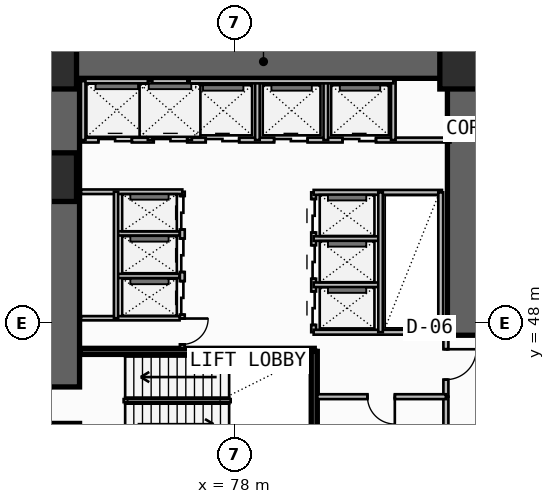
"""IFC4 building model, lengths in metres.
Left out: names, types, materials, properties, quantities, classifications, styles, units other than length and angle.
Written with IfcOpenShell. Run it as: python <this file> out.ifc"""

import sys

from ifc_helpers import new_model, si_unit, direction, frame, frame_2d, origin, origin_2d, place, context, subcontext, project, spatial, rectangle, extrude, element, fill, save


model = new_model("IFC4")
c1 = context("Model", 3, precision=1e-05, world=origin(), true_north=direction((0.0, 1.0)))
c2 = subcontext(c1, "Body", "Model", "MODEL_VIEW")
j1 = project(units=[si_unit("LENGTHUNIT", "METRE"), si_unit("PLANEANGLEUNIT", "RADIAN")], contexts=[c1])
p1 = place(None, origin())
s1 = spatial("IfcSite", under=j1, at=p1, CompositionType="ELEMENT")
p2 = place(p1, origin())
s2 = spatial("IfcBuilding", under=s1, at=p2, CompositionType="ELEMENT")
p3 = place(p2, origin())
s3 = spatial("IfcBuildingStorey", under=s2, at=p3, CompositionType="ELEMENT", Elevation=0.0)
p4 = place(p3, frame((72.35, 43.35, -0.4), z_axis=(0.0, 0.0, 1.0), x_axis=(0.0, 1.0, 0.0)))
e1 = element("IfcWall", 1, at=p4, inside=s3, PredefinedType="SHEAR", context=c2, shape_type="SweptSolid", body=[
    extrude(rectangle(XDim=12.7, YDim=1.1, at=frame_2d((6.35, 0.0))), origin(), (0.0, 0.0, 1.0), 4.58),
])
p5 = place(p4, frame((1.35, 0.0, 0.4)))
e2 = element("IfcOpeningElement", 2, at=p5, cuts=e1, PredefinedType="OPENING", context=c2, shape_type="SweptSolid", body=[
    extrude(rectangle(XDim=1.2, YDim=2.2, at=frame_2d((0.6, 1.1))), frame((0.0, 0.56, 0.0), z_axis=(0.0, -1.0, 0.0), x_axis=(1.0, 0.0, 0.0)), (0.0, 0.0, 1.0), 1.12),
])
p6 = place(p3, frame((71.8, 56.6, -0.4), z_axis=(0.0, 0.0, 1.0), x_axis=(1.0, 0.0, 0.0)))
e3 = element("IfcWall", 3, at=p6, inside=s3, PredefinedType="SHEAR", context=c2, shape_type="SweptSolid", body=[
    extrude(rectangle(XDim=14.3, YDim=1.1, at=frame_2d((7.15, 0.0))), origin(), (0.0, 0.0, 1.0), 4.58),
])
p7 = place(p3, frame((85.55, 47.6, -0.4), z_axis=(0.0, 0.0, 1.0), x_axis=(0.0, 1.0, 0.0)))
e4 = element("IfcWall", 4, at=p7, inside=s3, PredefinedType="SHEAR", context=c2, shape_type="SweptSolid", body=[
    extrude(rectangle(XDim=8.45, YDim=1.1, at=frame_2d((4.225, 0.0))), origin(), (0.0, 0.0, 1.0), 4.58),
])
for number, where, z_axis, x_axis in (
    (5, (72.0, 52.8, 0.0), (0.0, 0.0, 1.0), (1.0, 0.0, 0.0)),
    (6, (72.0, 56.5, 0.0), (0.0, 0.0, 1.0), (1.0, 0.0, 0.0)),
    (7, (85.55, 56.5, 0.0), (0.0, 0.0, 1.0), (1.0, 0.0, 0.0)),
):
    element("IfcColumn", number, at=place(p3, frame(where, z_axis=z_axis, x_axis=x_axis)), inside=s3, PredefinedType="COLUMN", context=c2, shape_type="SweptSolid", body=[
        extrude(rectangle(XDim=1.6, YDim=1.6, at=origin_2d()), origin(), (0.0, 0.0, 1.0), 4.5),
    ])
p8 = place(p3, frame((72.92, 47.07, -0.4), z_axis=(0.0, 0.0, 1.0), x_axis=(1.0, 0.0, 0.0)))
e8 = element("IfcWall", 8, at=p8, inside=s3, PredefinedType="SOLIDWALL", context=c2, shape_type="SweptSolid", body=[
    extrude(rectangle(XDim=7.7, YDim=0.2, at=frame_2d((3.85, 0.0))), origin(), (0.0, 0.0, 1.0), 4.58),
])
p9 = place(p3, frame((80.62, 43.83, -0.4), z_axis=(0.0, 0.0, 1.0), x_axis=(0.0, 1.0, 0.0)))
e9 = element("IfcWall", 9, at=p9, inside=s3, PredefinedType="SOLIDWALL", context=c2, shape_type="SweptSolid", body=[
    extrude(rectangle(XDim=3.24, YDim=0.2, at=frame_2d((1.62, 0.0))), origin(), (0.0, 0.0, 1.0), 4.58),
])
p10 = place(p3, frame((84.95, 43.68, 0.0), z_axis=(0.0, 0.0, 1.0), x_axis=(0.0, 1.0, 0.0)))
e10 = element("IfcWall", 10, at=p10, inside=s3, PredefinedType="PLUMBINGWALL", context=c2, shape_type="SweptSolid", body=[
    extrude(rectangle(XDim=1.9, YDim=0.165, at=frame_2d((0.95, 0.0))), origin(), (0.0, 0.0, 1.0), 4.18),
])
p11 = place(p3, frame((84.95, 45.58, 0.0), z_axis=(0.0, 0.0, 1.0), x_axis=(0.0, 1.0, 0.0)))
e11 = element("IfcWall", 11, at=p11, inside=s3, PredefinedType="PARTITIONING", context=c2, shape_type="SweptSolid", body=[
    extrude(rectangle(XDim=2.12, YDim=0.165, at=frame_2d((1.06, 0.0))), origin(), (0.0, 0.0, 1.0), 4.18),
])
p12 = place(p11, frame((0.56, 0.0, 0.0)))
e12 = element("IfcOpeningElement", 12, at=p12, cuts=e11, PredefinedType="OPENING", context=c2, shape_type="SweptSolid", body=[
    extrude(rectangle(XDim=1.0, YDim=2.2, at=frame_2d((0.5, 1.1))), frame((0.0, 0.093, 0.0), z_axis=(0.0, -1.0, 0.0), x_axis=(1.0, 0.0, 0.0)), (0.0, 0.0, 1.0), 0.185),
])
p13 = place(p3, frame((80.72, 45.58, 0.0), z_axis=(0.0, 0.0, 1.0), x_axis=(1.0, 0.0, 0.0)))
e13 = element("IfcWall", 13, at=p13, inside=s3, PredefinedType="PLUMBINGWALL", context=c2, shape_type="SweptSolid", body=[
    extrude(rectangle(XDim=4.23, YDim=0.16, at=frame_2d((2.115, 0.0))), origin(), (0.0, 0.0, 1.0), 4.18),
])
p14 = place(p13, frame((1.65, 0.0, 0.0)))
e14 = element("IfcOpeningElement", 14, at=p14, cuts=e13, PredefinedType="OPENING", context=c2, shape_type="SweptSolid", body=[
    extrude(rectangle(XDim=0.9, YDim=2.1, at=frame_2d((0.45, 1.05))), frame((0.0, 0.09, 0.0), z_axis=(0.0, -1.0, 0.0), x_axis=(1.0, 0.0, 0.0)), (0.0, 0.0, 1.0), 0.18),
])
p15 = place(p3, frame((76.28, 47.18, 0.0), z_axis=(0.0, 0.0, 1.0), x_axis=(0.0, 1.0, 0.0)))
e15 = element("IfcWall", 15, at=p15, inside=s3, PredefinedType="SOLIDWALL", context=c2, shape_type="SweptSolid", body=[
    extrude(rectangle(XDim=5.14, YDim=0.16, at=frame_2d((2.57, 0.0))), origin(), (0.0, 0.0, 1.0), 4.18),
])
p16 = place(p15, frame((1.1, 0.0, 0.0)))
e16 = element("IfcOpeningElement", 16, at=p16, cuts=e15, PredefinedType="OPENING", context=c2, shape_type="SweptSolid", body=[
    extrude(rectangle(XDim=1.1, YDim=2.25, at=frame_2d((0.55, 1.125))), frame((0.0, 0.09, 0.0), z_axis=(0.0, -1.0, 0.0), x_axis=(1.0, 0.0, 0.0)), (0.0, 0.0, 1.0), 0.18),
])
p17 = place(p15, frame((2.5, 0.0, 0.0)))
e17 = element("IfcOpeningElement", 17, at=p17, cuts=e15, PredefinedType="OPENING", context=c2, shape_type="SweptSolid", body=[
    extrude(rectangle(XDim=1.1, YDim=2.25, at=frame_2d((0.55, 1.125))), frame((0.0, 0.09, 0.0), z_axis=(0.0, -1.0, 0.0), x_axis=(1.0, 0.0, 0.0)), (0.0, 0.0, 1.0), 0.18),
])
p18 = place(p15, frame((3.9, 0.0, 0.0)))
e18 = element("IfcOpeningElement", 18, at=p18, cuts=e15, PredefinedType="OPENING", context=c2, shape_type="SweptSolid", body=[
    extrude(rectangle(XDim=1.1, YDim=2.25, at=frame_2d((0.55, 1.125))), frame((0.0, 0.09, 0.0), z_axis=(0.0, -1.0, 0.0), x_axis=(1.0, 0.0, 0.0)), (0.0, 0.0, 1.0), 0.18),
])
p19 = place(p15, frame((0.12, 0.0, 0.0)))
e19 = element("IfcOpeningElement", 19, at=p19, cuts=e15, PredefinedType="OPENING", context=c2, shape_type="SweptSolid", body=[
    extrude(rectangle(XDim=0.85, YDim=2.05, at=frame_2d((0.425, 1.025))), frame((0.0, 0.09, 0.0), z_axis=(0.0, -1.0, 0.0), x_axis=(1.0, 0.0, 0.0)), (0.0, 0.0, 1.0), 0.18),
])
p20 = place(p3, frame((72.95, 52.32, 0.0), z_axis=(0.0, 0.0, 1.0), x_axis=(1.0, 0.0, 0.0)))
e20 = element("IfcWall", 20, at=p20, inside=s3, PredefinedType="SOLIDWALL", context=c2, shape_type="SweptSolid", body=[
    extrude(rectangle(XDim=3.33, YDim=0.15, at=frame_2d((1.665, 0.0))), origin(), (0.0, 0.0, 1.0), 4.18),
])
p21 = place(p3, frame((72.95, 48.16, 0.0), z_axis=(0.0, 0.0, 1.0), x_axis=(1.0, 0.0, 0.0)))
e21 = element("IfcWall", 21, at=p21, inside=s3, PredefinedType="PLUMBINGWALL", context=c2, shape_type="SweptSolid", body=[
    extrude(rectangle(XDim=3.24, YDim=0.14, at=frame_2d((1.62, 0.0))), origin(), (0.0, 0.0, 1.0), 4.18),
])
for number, where, z_axis, x_axis in (
    (22, (74.15, 49.55, 0.0), (0.0, 0.0, 1.0), (1.0, 0.0, 0.0)),
    (23, (74.15, 50.95, 0.0), (0.0, 0.0, 1.0), (1.0, 0.0, 0.0)),
):
    element("IfcWall", number, at=place(p3, frame(where, z_axis=z_axis, x_axis=x_axis)), inside=s3, PredefinedType="PLUMBINGWALL", context=c2, shape_type="SweptSolid", body=[
        extrude(rectangle(XDim=2.04, YDim=0.14, at=frame_2d((1.02, 0.0))), origin(), (0.0, 0.0, 1.0), 4.18),
    ])
p22 = place(p3, frame((74.1, 48.16, 0.0), z_axis=(0.0, 0.0, 1.0), x_axis=(0.0, 1.0, 0.0)))
e24 = element("IfcWall", 24, at=p22, inside=s3, PredefinedType="PLUMBINGWALL", context=c2, shape_type="SweptSolid", body=[
    extrude(rectangle(XDim=4.16, YDim=0.14, at=frame_2d((2.08, 0.0))), origin(), (0.0, 0.0, 1.0), 4.18),
])
p23 = place(p3, frame((80.6, 47.7, 0.0), z_axis=(0.0, 0.0, 1.0), x_axis=(0.0, 1.0, 0.0)))
e25 = element("IfcWall", 25, at=p23, inside=s3, PredefinedType="SOLIDWALL", context=c2, shape_type="SweptSolid", body=[
    extrude(rectangle(XDim=4.6, YDim=0.16, at=frame_2d((2.3, 0.0))), origin(), (0.0, 0.0, 1.0), 4.18),
])
p24 = place(p23, frame((0.24, 0.0, 0.0)))
e26 = element("IfcOpeningElement", 26, at=p24, cuts=e25, PredefinedType="OPENING", context=c2, shape_type="SweptSolid", body=[
    extrude(rectangle(XDim=1.1, YDim=2.25, at=frame_2d((0.55, 1.125))), frame((0.0, 0.09, 0.0), z_axis=(0.0, -1.0, 0.0), x_axis=(1.0, 0.0, 0.0)), (0.0, 0.0, 1.0), 0.18),
])
p25 = place(p23, frame((1.76, 0.0, 0.0)))
e27 = element("IfcOpeningElement", 27, at=p25, cuts=e25, PredefinedType="OPENING", context=c2, shape_type="SweptSolid", body=[
    extrude(rectangle(XDim=1.1, YDim=2.25, at=frame_2d((0.55, 1.125))), frame((0.0, 0.09, 0.0), z_axis=(0.0, -1.0, 0.0), x_axis=(1.0, 0.0, 0.0)), (0.0, 0.0, 1.0), 0.18),
])
p26 = place(p23, frame((3.28, 0.0, 0.0)))
e28 = element("IfcOpeningElement", 28, at=p26, cuts=e25, PredefinedType="OPENING", context=c2, shape_type="SweptSolid", body=[
    extrude(rectangle(XDim=1.1, YDim=2.25, at=frame_2d((0.55, 1.125))), frame((0.0, 0.09, 0.0), z_axis=(0.0, -1.0, 0.0), x_axis=(1.0, 0.0, 0.0)), (0.0, 0.0, 1.0), 0.18),
])
p27 = place(p3, frame((80.6, 47.7, 0.0), z_axis=(0.0, 0.0, 1.0), x_axis=(1.0, 0.0, 0.0)))
e29 = element("IfcWall", 29, at=p27, inside=s3, PredefinedType="SOLIDWALL", context=c2, shape_type="SweptSolid", body=[
    extrude(rectangle(XDim=4.4, YDim=0.16, at=frame_2d((2.2, 0.0))), origin(), (0.0, 0.0, 1.0), 4.18),
])
p28 = place(p3, frame((80.6, 52.3, 0.0), z_axis=(0.0, 0.0, 1.0), x_axis=(1.0, 0.0, 0.0)))
e30 = element("IfcWall", 30, at=p28, inside=s3, PredefinedType="SOLIDWALL", context=c2, shape_type="SweptSolid", body=[
    extrude(rectangle(XDim=4.22, YDim=0.16, at=frame_2d((2.11, 0.0))), origin(), (0.0, 0.0, 1.0), 4.18),
])
for number, where, z_axis, x_axis in (
    (31, (80.6, 49.26, 0.0), (0.0, 0.0, 1.0), (1.0, 0.0, 0.0)),
    (32, (80.6, 50.78, 0.0), (0.0, 0.0, 1.0), (1.0, 0.0, 0.0)),
):
    element("IfcWall", number, at=place(p3, frame(where, z_axis=z_axis, x_axis=x_axis)), inside=s3, PredefinedType="PLUMBINGWALL", context=c2, shape_type="SweptSolid", body=[
        extrude(rectangle(XDim=2.2, YDim=0.15, at=frame_2d((1.1, 0.0))), origin(), (0.0, 0.0, 1.0), 4.18),
    ])
p29 = place(p3, frame((82.8, 47.7, 0.0), z_axis=(0.0, 0.0, 1.0), x_axis=(0.0, 1.0, 0.0)))
e33 = element("IfcWall", 33, at=p29, inside=s3, PredefinedType="PLUMBINGWALL", context=c2, shape_type="SweptSolid", body=[
    extrude(rectangle(XDim=4.6, YDim=0.15, at=frame_2d((2.3, 0.0))), origin(), (0.0, 0.0, 1.0), 4.18),
])
p30 = place(p3, frame((84.78, 47.7, 0.0), z_axis=(0.0, 0.0, 1.0), x_axis=(0.0, 1.0, 0.0)))
e34 = element("IfcWall", 34, at=p30, inside=s3, PredefinedType="SOLIDWALL", context=c2, shape_type="SweptSolid", body=[
    extrude(rectangle(XDim=4.6, YDim=0.16, at=frame_2d((2.3, 0.0))), origin(), (0.0, 0.0, 1.0), 4.18),
])
p31 = place(p3, frame((73.02, 54.02, 0.0), z_axis=(0.0, 0.0, 1.0), x_axis=(1.0, 0.0, 0.0)))
e35 = element("IfcWall", 35, at=p31, inside=s3, PredefinedType="SOLIDWALL", context=c2, shape_type="SweptSolid", body=[
    extrude(rectangle(XDim=12.08, YDim=0.16, at=frame_2d((6.04, 0.0))), origin(), (0.0, 0.0, 1.0), 4.18),
])
p32 = place(p31, frame((0.5, 0.0, 0.0)))
e36 = element("IfcOpeningElement", 36, at=p32, cuts=e35, PredefinedType="OPENING", context=c2, shape_type="SweptSolid", body=[
    extrude(rectangle(XDim=1.1, YDim=2.25, at=frame_2d((0.55, 1.125))), frame((0.0, 0.09, 0.0), z_axis=(0.0, -1.0, 0.0), x_axis=(1.0, 0.0, 0.0)), (0.0, 0.0, 1.0), 0.18),
])
p33 = place(p31, frame((2.32, 0.0, 0.0)))
e37 = element("IfcOpeningElement", 37, at=p33, cuts=e35, PredefinedType="OPENING", context=c2, shape_type="SweptSolid", body=[
    extrude(rectangle(XDim=1.1, YDim=2.25, at=frame_2d((0.55, 1.125))), frame((0.0, 0.09, 0.0), z_axis=(0.0, -1.0, 0.0), x_axis=(1.0, 0.0, 0.0)), (0.0, 0.0, 1.0), 0.18),
])
p34 = place(p31, frame((4.03, 0.0, 0.0)))
e38 = element("IfcOpeningElement", 38, at=p34, cuts=e35, PredefinedType="OPENING", context=c2, shape_type="SweptSolid", body=[
    extrude(rectangle(XDim=1.1, YDim=2.25, at=frame_2d((0.55, 1.125))), frame((0.0, 0.09, 0.0), z_axis=(0.0, -1.0, 0.0), x_axis=(1.0, 0.0, 0.0)), (0.0, 0.0, 1.0), 0.18),
])
p35 = place(p31, frame((6.28, 0.0, 0.0)))
e39 = element("IfcOpeningElement", 39, at=p35, cuts=e35, PredefinedType="OPENING", context=c2, shape_type="SweptSolid", body=[
    extrude(rectangle(XDim=1.1, YDim=2.25, at=frame_2d((0.55, 1.125))), frame((0.0, 0.09, 0.0), z_axis=(0.0, -1.0, 0.0), x_axis=(1.0, 0.0, 0.0)), (0.0, 0.0, 1.0), 0.18),
])
p36 = place(p31, frame((8.53, 0.0, 0.0)))
e40 = element("IfcOpeningElement", 40, at=p36, cuts=e35, PredefinedType="OPENING", context=c2, shape_type="SweptSolid", body=[
    extrude(rectangle(XDim=1.1, YDim=2.25, at=frame_2d((0.55, 1.125))), frame((0.0, 0.09, 0.0), z_axis=(0.0, -1.0, 0.0), x_axis=(1.0, 0.0, 0.0)), (0.0, 0.0, 1.0), 0.18),
])
p37 = place(p3, frame((73.02, 55.96, 0.0), z_axis=(0.0, 0.0, 1.0), x_axis=(1.0, 0.0, 0.0)))
e41 = element("IfcWall", 41, at=p37, inside=s3, PredefinedType="SOLIDWALL", context=c2, shape_type="SweptSolid", body=[
    extrude(rectangle(XDim=3.5, YDim=0.15, at=frame_2d((1.75, 0.0))), origin(), (0.0, 0.0, 1.0), 4.18),
])
p38 = place(p3, frame((73.02, 54.02, 0.0), z_axis=(0.0, 0.0, 1.0), x_axis=(0.0, 1.0, 0.0)))
e42 = element("IfcWall", 42, at=p38, inside=s3, PredefinedType="PLUMBINGWALL", context=c2, shape_type="SweptSolid", body=[
    extrude(rectangle(XDim=1.94, YDim=0.15, at=frame_2d((0.97, 0.0))), origin(), (0.0, 0.0, 1.0), 4.18),
])
p39 = place(p3, frame((76.52, 54.02, 0.0), z_axis=(0.0, 0.0, 1.0), x_axis=(0.0, 1.0, 0.0)))
e43 = element("IfcWall", 43, at=p39, inside=s3, PredefinedType="SOLIDWALL", context=c2, shape_type="SweptSolid", body=[
    extrude(rectangle(XDim=1.94, YDim=0.15, at=frame_2d((0.97, 0.0))), origin(), (0.0, 0.0, 1.0), 4.18),
])
p40 = place(p3, frame((75.22, 54.02, 0.0), z_axis=(0.0, 0.0, 1.0), x_axis=(0.0, 1.0, 0.0)))
e44 = element("IfcWall", 44, at=p40, inside=s3, PredefinedType="PLUMBINGWALL", context=c2, shape_type="SweptSolid", body=[
    extrude(rectangle(XDim=1.94, YDim=0.15, at=frame_2d((0.97, 0.0))), origin(), (0.0, 0.0, 1.0), 4.18),
])
for number, where, z_axis, x_axis in (
    (45, (78.75, 54.02, 0.0), (0.0, 0.0, 1.0), (0.0, 1.0, 0.0)),
    (46, (81.0, 54.02, 0.0), (0.0, 0.0, 1.0), (0.0, 1.0, 0.0)),
):
    element("IfcWall", number, at=place(p3, frame(where, z_axis=z_axis, x_axis=x_axis)), inside=s3, PredefinedType="PLUMBINGWALL", context=c2, shape_type="SweptSolid", body=[
        extrude(rectangle(XDim=1.96, YDim=0.15, at=frame_2d((0.98, 0.0))), origin(), (0.0, 0.0, 1.0), 4.18),
    ])
p41 = place(p3, frame((83.22, 54.02, 0.0), z_axis=(0.0, 0.0, 1.0), x_axis=(0.0, 1.0, 0.0)))
e47 = element("IfcWall", 47, at=p41, inside=s3, PredefinedType="SOLIDWALL", context=c2, shape_type="SweptSolid", body=[
    extrude(rectangle(XDim=1.96, YDim=0.15, at=frame_2d((0.98, 0.0))), origin(), (0.0, 0.0, 1.0), 4.18),
])
p42 = place(p3, frame((76.52, 55.96, 0.0), z_axis=(0.0, 0.0, 1.0), x_axis=(1.0, 0.0, 0.0)))
e48 = element("IfcWall", 48, at=p42, inside=s3, PredefinedType="SOLIDWALL", context=c2, shape_type="SweptSolid", body=[
    extrude(rectangle(XDim=6.7, YDim=0.15, at=frame_2d((3.35, 0.0))), origin(), (0.0, 0.0, 1.0), 4.18),
])
p43 = place(p5, origin())
e49 = element("IfcDoor", 49, at=p43, inside=s3, OperationType="SINGLE_SWING_LEFT", PredefinedType="USERDEFINED", context=c2, shape_type="SweptSolid", body=[
    extrude(rectangle(XDim=1.2, YDim=2.2, at=frame_2d((0.6, 1.1))), frame((0.0, 0.025, 0.0), z_axis=(0.0, -1.0, 0.0), x_axis=(1.0, 0.0, 0.0)), (0.0, 0.0, 1.0), 0.05),
])
fill(e2, e49)
p44 = place(p12, frame((1.0, 0.0, 0.0), z_axis=(0.0, 0.0, 1.0), x_axis=(-1.0, 0.0, 0.0)))
e50 = element("IfcDoor", 50, at=p44, inside=s3, OperationType="SINGLE_SWING_LEFT", PredefinedType="DOOR", context=c2, shape_type="SweptSolid", body=[
    extrude(rectangle(XDim=1.0, YDim=2.2, at=frame_2d((0.5, 1.1))), frame((0.0, 0.025, 0.0), z_axis=(0.0, -1.0, 0.0), x_axis=(1.0, 0.0, 0.0)), (0.0, 0.0, 1.0), 0.05),
])
fill(e12, e50)
p45 = place(p14, frame((0.9, 0.0, 0.0), z_axis=(0.0, 0.0, 1.0), x_axis=(-1.0, 0.0, 0.0)))
e51 = element("IfcDoor", 51, at=p45, inside=s3, OperationType="SINGLE_SWING_LEFT", PredefinedType="DOOR", context=c2, shape_type="SweptSolid", body=[
    extrude(rectangle(XDim=0.9, YDim=2.1, at=frame_2d((0.45, 1.05))), frame((0.0, 0.025, 0.0), z_axis=(0.0, -1.0, 0.0), x_axis=(1.0, 0.0, 0.0)), (0.0, 0.0, 1.0), 0.05),
])
fill(e14, e51)
p46 = place(p16, origin())
e52 = element("IfcDoor", 52, at=p46, inside=s3, OperationType="DOUBLE_DOOR_SLIDING", PredefinedType="DOOR", context=c2, shape_type="SweptSolid", body=[
    extrude(rectangle(XDim=1.1, YDim=2.25, at=frame_2d((0.55, 1.125))), frame((0.0, 0.025, 0.0), z_axis=(0.0, -1.0, 0.0), x_axis=(1.0, 0.0, 0.0)), (0.0, 0.0, 1.0), 0.05),
])
fill(e16, e52)
p47 = place(p17, origin())
e53 = element("IfcDoor", 53, at=p47, inside=s3, OperationType="DOUBLE_DOOR_SLIDING", PredefinedType="DOOR", context=c2, shape_type="SweptSolid", body=[
    extrude(rectangle(XDim=1.1, YDim=2.25, at=frame_2d((0.55, 1.125))), frame((0.0, 0.025, 0.0), z_axis=(0.0, -1.0, 0.0), x_axis=(1.0, 0.0, 0.0)), (0.0, 0.0, 1.0), 0.05),
])
fill(e17, e53)
p48 = place(p18, origin())
e54 = element("IfcDoor", 54, at=p48, inside=s3, OperationType="DOUBLE_DOOR_SLIDING", PredefinedType="DOOR", context=c2, shape_type="SweptSolid", body=[
    extrude(rectangle(XDim=1.1, YDim=2.25, at=frame_2d((0.55, 1.125))), frame((0.0, 0.025, 0.0), z_axis=(0.0, -1.0, 0.0), x_axis=(1.0, 0.0, 0.0)), (0.0, 0.0, 1.0), 0.05),
])
fill(e18, e54)
p49 = place(p19, frame((0.85, 0.0, 0.0), z_axis=(0.0, 0.0, 1.0), x_axis=(-1.0, 0.0, 0.0)))
e55 = element("IfcDoor", 55, at=p49, inside=s3, OperationType="SINGLE_SWING_LEFT", PredefinedType="DOOR", context=c2, shape_type="SweptSolid", body=[
    extrude(rectangle(XDim=0.85, YDim=2.05, at=frame_2d((0.425, 1.025))), frame((0.0, 0.025, 0.0), z_axis=(0.0, -1.0, 0.0), x_axis=(1.0, 0.0, 0.0)), (0.0, 0.0, 1.0), 0.05),
])
fill(e19, e55)
p50 = place(p24, frame((1.1, 0.0, 0.0), z_axis=(0.0, 0.0, 1.0), x_axis=(-1.0, 0.0, 0.0)))
e56 = element("IfcDoor", 56, at=p50, inside=s3, OperationType="DOUBLE_DOOR_SLIDING", PredefinedType="DOOR", context=c2, shape_type="SweptSolid", body=[
    extrude(rectangle(XDim=1.1, YDim=2.25, at=frame_2d((0.55, 1.125))), frame((0.0, 0.025, 0.0), z_axis=(0.0, -1.0, 0.0), x_axis=(1.0, 0.0, 0.0)), (0.0, 0.0, 1.0), 0.05),
])
fill(e26, e56)
p51 = place(p25, frame((1.1, 0.0, 0.0), z_axis=(0.0, 0.0, 1.0), x_axis=(-1.0, 0.0, 0.0)))
e57 = element("IfcDoor", 57, at=p51, inside=s3, OperationType="DOUBLE_DOOR_SLIDING", PredefinedType="DOOR", context=c2, shape_type="SweptSolid", body=[
    extrude(rectangle(XDim=1.1, YDim=2.25, at=frame_2d((0.55, 1.125))), frame((0.0, 0.025, 0.0), z_axis=(0.0, -1.0, 0.0), x_axis=(1.0, 0.0, 0.0)), (0.0, 0.0, 1.0), 0.05),
])
fill(e27, e57)
p52 = place(p26, frame((1.1, 0.0, 0.0), z_axis=(0.0, 0.0, 1.0), x_axis=(-1.0, 0.0, 0.0)))
e58 = element("IfcDoor", 58, at=p52, inside=s3, OperationType="DOUBLE_DOOR_SLIDING", PredefinedType="DOOR", context=c2, shape_type="SweptSolid", body=[
    extrude(rectangle(XDim=1.1, YDim=2.25, at=frame_2d((0.55, 1.125))), frame((0.0, 0.025, 0.0), z_axis=(0.0, -1.0, 0.0), x_axis=(1.0, 0.0, 0.0)), (0.0, 0.0, 1.0), 0.05),
])
fill(e28, e58)
p53 = place(p32, origin())
e59 = element("IfcDoor", 59, at=p53, inside=s3, OperationType="DOUBLE_DOOR_SLIDING", PredefinedType="DOOR", context=c2, shape_type="SweptSolid", body=[
    extrude(rectangle(XDim=1.1, YDim=2.25, at=frame_2d((0.55, 1.125))), frame((0.0, 0.025, 0.0), z_axis=(0.0, -1.0, 0.0), x_axis=(1.0, 0.0, 0.0)), (0.0, 0.0, 1.0), 0.05),
])
fill(e36, e59)
p54 = place(p33, origin())
e60 = element("IfcDoor", 60, at=p54, inside=s3, OperationType="DOUBLE_DOOR_SLIDING", PredefinedType="DOOR", context=c2, shape_type="SweptSolid", body=[
    extrude(rectangle(XDim=1.1, YDim=2.25, at=frame_2d((0.55, 1.125))), frame((0.0, 0.025, 0.0), z_axis=(0.0, -1.0, 0.0), x_axis=(1.0, 0.0, 0.0)), (0.0, 0.0, 1.0), 0.05),
])
fill(e37, e60)
p55 = place(p34, origin())
e61 = element("IfcDoor", 61, at=p55, inside=s3, OperationType="DOUBLE_DOOR_SLIDING", PredefinedType="DOOR", context=c2, shape_type="SweptSolid", body=[
    extrude(rectangle(XDim=1.1, YDim=2.25, at=frame_2d((0.55, 1.125))), frame((0.0, 0.025, 0.0), z_axis=(0.0, -1.0, 0.0), x_axis=(1.0, 0.0, 0.0)), (0.0, 0.0, 1.0), 0.05),
])
fill(e38, e61)
p56 = place(p35, origin())
e62 = element("IfcDoor", 62, at=p56, inside=s3, OperationType="DOUBLE_DOOR_SLIDING", PredefinedType="DOOR", context=c2, shape_type="SweptSolid", body=[
    extrude(rectangle(XDim=1.1, YDim=2.25, at=frame_2d((0.55, 1.125))), frame((0.0, 0.025, 0.0), z_axis=(0.0, -1.0, 0.0), x_axis=(1.0, 0.0, 0.0)), (0.0, 0.0, 1.0), 0.05),
])
fill(e39, e62)
p57 = place(p36, origin())
e63 = element("IfcDoor", 63, at=p57, inside=s3, OperationType="DOUBLE_DOOR_SLIDING", PredefinedType="DOOR", context=c2, shape_type="SweptSolid", body=[
    extrude(rectangle(XDim=1.1, YDim=2.25, at=frame_2d((0.55, 1.125))), frame((0.0, 0.025, 0.0), z_axis=(0.0, -1.0, 0.0), x_axis=(1.0, 0.0, 0.0)), (0.0, 0.0, 1.0), 0.05),
])
fill(e40, e63)
save(model, sys.argv[1])
